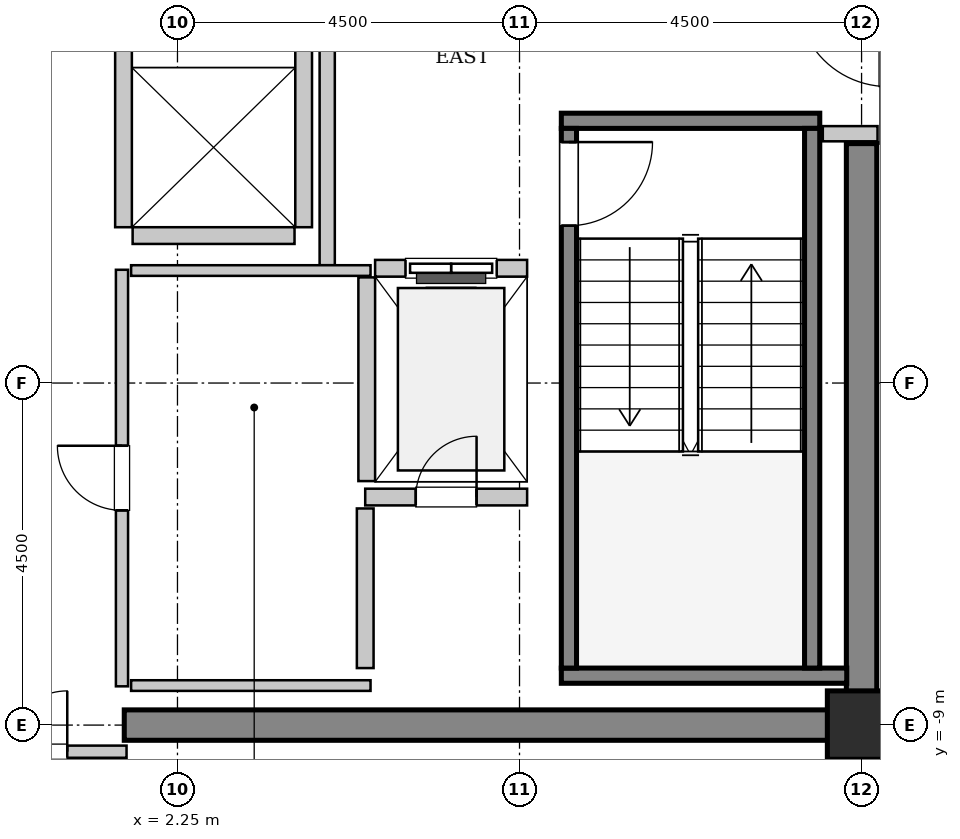
"""IFC4 building model, lengths in metres.
Left out: names, types, materials, properties, quantities, classifications, styles, units other than length and angle.
Written with IfcOpenShell. Run it as: python <this file> out.ifc"""

import sys

from ifc_helpers import new_model, si_unit, direction, frame, frame_2d, origin, origin_2d, place, context, subcontext, project, spatial, rectangle, extrude, source, transform, mapped, element, fill, save


model = new_model("IFC4")
c1 = context("Model", 3, precision=1e-05, world=origin(), true_north=direction((0.0, 1.0)))
c2 = subcontext(c1, "Body", "Model", "MODEL_VIEW")
j1 = project(units=[si_unit("LENGTHUNIT", "METRE"), si_unit("PLANEANGLEUNIT", "RADIAN")], contexts=[c1])
p1 = place(None, origin())
s1 = spatial("IfcSite", under=j1, at=p1, CompositionType="ELEMENT")
p2 = place(p1, origin())
s2 = spatial("IfcBuilding", under=s1, at=p2, CompositionType="ELEMENT")
p3 = place(p2, frame((0.0, 0.0, 326.2)))
s3 = spatial("IfcBuildingStorey", under=s2, at=p3, CompositionType="ELEMENT", Elevation=326.2)
m1 = source(origin(), c2, "Body", "SweptSolid", [
    extrude(rectangle(XDim=9.9, YDim=0.4, at=frame_2d((4.95, 0.0))), origin(), (0.0, 0.0, 1.0), 3.8),
])
p4 = place(p3, frame((1.55, -9.0, 0.0), z_axis=(0.0, 0.0, 1.0), x_axis=(1.0, 0.0, 0.0)))
e1 = element("IfcWall", 1, at=p4, inside=s3, PredefinedType="SHEAR", context=c2, shape_type="MappedRepresentation", body=[
    mapped(m1, transform((0.0, 0.0, 0.0), x_axis=(1.0, 0.0, 0.0), y_axis=(0.0, 1.0, 0.0), z_axis=(0.0, 0.0, 1.0), scale=1.0)),
])
m2 = source(origin(), c2, "Body", "SweptSolid", [
    extrude(rectangle(XDim=7.45, YDim=0.4, at=frame_2d((3.725, 0.0))), origin(), (0.0, 0.0, 1.0), 3.8),
])
p5 = place(p3, frame((11.25, -8.8, 0.0), z_axis=(0.0, 0.0, 1.0), x_axis=(0.0, 1.0, 0.0)))
e2 = element("IfcWall", 2, at=p5, inside=s3, PredefinedType="SHEAR", context=c2, shape_type="MappedRepresentation", body=[
    mapped(m2, transform((0.0, 0.0, 0.0), x_axis=(1.0, 0.0, 0.0), y_axis=(0.0, 1.0, 0.0), z_axis=(0.0, 0.0, 1.0), scale=1.0)),
])
m3 = source(origin(), c2, "Body", "SweptSolid", [
    extrude(rectangle(XDim=0.9, YDim=0.9, at=origin_2d()), origin(), (0.0, 0.0, 1.0), 3.8),
])
p6 = place(p3, frame((11.25, -9.0, 0.0), z_axis=(0.0, 0.0, 1.0), x_axis=(1.0, 0.0, 0.0)))
e3 = element("IfcColumn", 3, at=p6, inside=s3, PredefinedType="COLUMN", context=c2, shape_type="MappedRepresentation", body=[
    mapped(m3, transform((0.0, 0.0, 0.0), x_axis=(1.0, 0.0, 0.0), y_axis=(0.0, 1.0, 0.0), z_axis=(0.0, 0.0, 1.0), scale=1.0)),
])
m4 = source(origin(), c2, "Body", "SweptSolid", [
    extrude(rectangle(XDim=3.4, YDim=0.2, at=frame_2d((1.7, 0.0))), origin(), (0.0, 0.0, 1.0), 3.8),
])
p7 = place(p3, frame((7.3, -1.05, 0.0), z_axis=(0.0, 0.0, 1.0), x_axis=(1.0, 0.0, 0.0)))
e4 = element("IfcWall", 4, at=p7, inside=s3, PredefinedType="SOLIDWALL", context=c2, shape_type="MappedRepresentation", body=[
    mapped(m4, transform((0.0, 0.0, 0.0), x_axis=(1.0, 0.0, 0.0), y_axis=(0.0, 1.0, 0.0), z_axis=(0.0, 0.0, 1.0), scale=1.0)),
])
m5 = source(origin(), c2, "Body", "SweptSolid", [
    extrude(rectangle(XDim=3.755, YDim=0.2, at=frame_2d((1.877, 0.0))), origin(), (0.0, 0.0, 1.0), 3.8),
])
p8 = place(p3, frame((7.3, -8.35, 0.0), z_axis=(0.0, 0.0, 1.0), x_axis=(1.0, 0.0, 0.0)))
e5 = element("IfcWall", 5, at=p8, inside=s3, PredefinedType="SOLIDWALL", context=c2, shape_type="MappedRepresentation", body=[
    mapped(m5, transform((0.0, 0.0, 0.0), x_axis=(1.0, 0.0, 0.0), y_axis=(0.0, 1.0, 0.0), z_axis=(0.0, 0.0, 1.0), scale=1.0)),
])
m6 = source(origin(), c2, "Body", "SweptSolid", [
    extrude(rectangle(XDim=7.1, YDim=0.2, at=frame_2d((3.55, 0.0))), origin(), (0.0, 0.0, 1.0), 3.8),
])
p9 = place(p3, frame((7.4, -1.15, 0.0), z_axis=(0.0, 0.0, 1.0), x_axis=(0.0, -1.0, 0.0)))
e6 = element("IfcWall", 6, at=p9, inside=s3, PredefinedType="SOLIDWALL", context=c2, shape_type="MappedRepresentation", body=[
    mapped(m6, transform((0.0, 0.0, 0.0), x_axis=(1.0, 0.0, 0.0), y_axis=(0.0, 1.0, 0.0), z_axis=(0.0, 0.0, 1.0), scale=1.0)),
])
p10 = place(p9, frame((0.18, 0.0, 0.0)))
e7 = element("IfcOpeningElement", 7, at=p10, cuts=e6, PredefinedType="OPENING", context=c2, shape_type="SweptSolid", body=[
    extrude(rectangle(XDim=1.1, YDim=2.15, at=frame_2d((0.55, 1.075))), frame((0.0, 0.11, 0.0), z_axis=(0.0, -1.0, 0.0), x_axis=(1.0, 0.0, 0.0)), (0.0, 0.0, 1.0), 0.22),
])
p11 = place(p3, frame((10.6, -1.15, 0.0), z_axis=(0.0, 0.0, 1.0), x_axis=(0.0, -1.0, 0.0)))
e8 = element("IfcWall", 8, at=p11, inside=s3, PredefinedType="SOLIDWALL", context=c2, shape_type="MappedRepresentation", body=[
    mapped(m6, transform((0.0, 0.0, 0.0), x_axis=(1.0, 0.0, 0.0), y_axis=(0.0, 1.0, 0.0), z_axis=(0.0, 0.0, 1.0), scale=1.0)),
])
m7 = source(origin(), c2, "Body", "SweptSolid", [
    extrude(rectangle(XDim=2.0, YDim=0.22, at=frame_2d((1.0, 0.0))), origin(), (0.0, 0.0, 1.0), 3.535),
])
p12 = place(p3, frame((6.85, -2.99, 0.0), z_axis=(0.0, 0.0, 1.0), x_axis=(-1.0, 0.0, 0.0)))
e9 = element("IfcWall", 9, at=p12, inside=s3, PredefinedType="SOLIDWALL", context=c2, shape_type="MappedRepresentation", body=[
    mapped(m7, transform((0.0, 0.0, 0.0), x_axis=(1.0, 0.0, 0.0), y_axis=(0.0, 1.0, 0.0), z_axis=(0.0, 0.0, 1.0), scale=1.0)),
])
p13 = place(p12, frame((0.4, 0.0, 0.0)))
e10 = element("IfcOpeningElement", 10, at=p13, cuts=e9, PredefinedType="OPENING", context=c2, shape_type="SweptSolid", body=[
    extrude(rectangle(XDim=1.2, YDim=2.2, at=frame_2d((0.6, 1.1))), frame((0.0, 0.12, 0.0), z_axis=(0.0, -1.0, 0.0), x_axis=(1.0, 0.0, 0.0)), (0.0, 0.0, 1.0), 0.24),
])
m8 = source(origin(), c2, "Body", "SweptSolid", [
    extrude(rectangle(XDim=2.68, YDim=0.22, at=frame_2d((1.34, 0.0))), origin(), (0.0, 0.0, 1.0), 3.535),
])
p14 = place(p3, frame((4.74, -3.11, 0.0), z_axis=(0.0, 0.0, 1.0), x_axis=(0.0, -1.0, 0.0)))
e11 = element("IfcWall", 11, at=p14, inside=s3, PredefinedType="SOLIDWALL", context=c2, shape_type="MappedRepresentation", body=[
    mapped(m8, transform((0.0, 0.0, 0.0), x_axis=(1.0, 0.0, 0.0), y_axis=(0.0, 1.0, 0.0), z_axis=(0.0, 0.0, 1.0), scale=1.0)),
])
m9 = source(origin(), c2, "Body", "SweptSolid", [
    extrude(rectangle(XDim=4.9, YDim=0.22, at=frame_2d((2.45, 0.0))), origin(), (0.0, 0.0, 1.0), 3.535),
])
for number, where, z_axis, x_axis in (
    (12, (1.54, 2.45, 0.0), (0.0, 0.0, 1.0), (0.0, -1.0, 0.0)),
    (13, (3.91, -2.45, 0.0), (0.0, 0.0, 1.0), (0.0, 1.0, 0.0)),
):
    element("IfcWall", number, at=place(p3, frame(where, z_axis=z_axis, x_axis=x_axis)), inside=s3, PredefinedType="SOLIDWALL", context=c2, shape_type="MappedRepresentation", body=[
        mapped(m9, transform((0.0, 0.0, 0.0), x_axis=(1.0, 0.0, 0.0), y_axis=(0.0, 1.0, 0.0), z_axis=(0.0, 0.0, 1.0), scale=1.0)),
    ])
m10 = source(origin(), c2, "Body", "SweptSolid", [
    extrude(rectangle(XDim=2.13, YDim=0.22, at=frame_2d((1.065, 0.0))), origin(), (0.0, 0.0, 1.0), 3.535),
])
p15 = place(p3, frame((1.66, -2.56, 0.0), z_axis=(0.0, 0.0, 1.0), x_axis=(1.0, 0.0, 0.0)))
e14 = element("IfcWall", 14, at=p15, inside=s3, PredefinedType="SOLIDWALL", context=c2, shape_type="MappedRepresentation", body=[
    mapped(m10, transform((0.0, 0.0, 0.0), x_axis=(1.0, 0.0, 0.0), y_axis=(0.0, 1.0, 0.0), z_axis=(0.0, 0.0, 1.0), scale=1.0)),
])
p16 = place(p3, frame((4.72, -6.0, 0.0), z_axis=(0.0, 0.0, 1.0), x_axis=(1.0, 0.0, 0.0)))
e15 = element("IfcWall", 15, at=p16, inside=s3, PredefinedType="SOLIDWALL", context=c2, shape_type="MappedRepresentation", body=[
    mapped(m10, transform((0.0, 0.0, 0.0), x_axis=(1.0, 0.0, 0.0), y_axis=(0.0, 1.0, 0.0), z_axis=(0.0, 0.0, 1.0), scale=1.0)),
])
p17 = place(p16, frame((0.665, 0.0, 0.0)))
e16 = element("IfcOpeningElement", 16, at=p17, cuts=e15, PredefinedType="OPENING", context=c2, shape_type="SweptSolid", body=[
    extrude(rectangle(XDim=0.8, YDim=2.0, at=frame_2d((0.4, 1.0))), frame((0.0, 0.12, 0.0), z_axis=(0.0, -1.0, 0.0), x_axis=(1.0, 0.0, 0.0)), (0.0, 0.0, 1.0), 0.24),
])
m11 = source(origin(), c2, "Body", "SweptSolid", [
    extrude(rectangle(XDim=2.1, YDim=0.22, at=frame_2d((1.05, 0.0))), origin(), (0.0, 0.0, 1.0), 3.535),
])
p18 = place(p3, frame((4.72, -8.25, 0.0), z_axis=(0.0, 0.0, 1.0), x_axis=(0.0, 1.0, 0.0)))
e17 = element("IfcWall", 17, at=p18, inside=s3, PredefinedType="SOLIDWALL", context=c2, shape_type="MappedRepresentation", body=[
    mapped(m11, transform((0.0, 0.0, 0.0), x_axis=(1.0, 0.0, 0.0), y_axis=(0.0, 1.0, 0.0), z_axis=(0.0, 0.0, 1.0), scale=1.0)),
])
m12 = source(origin(), c2, "Body", "SweptSolid", [
    extrude(rectangle(XDim=5.9, YDim=0.2, at=frame_2d((2.95, 0.0))), origin(), (0.0, 0.0, 1.0), 3.535),
])
p19 = place(p3, frame((4.22, -2.95, 0.0), z_axis=(0.0, 0.0, 1.0), x_axis=(0.0, 1.0, 0.0)))
e18 = element("IfcWall", 18, at=p19, inside=s3, PredefinedType="PARTITIONING", context=c2, shape_type="MappedRepresentation", body=[
    mapped(m12, transform((0.0, 0.0, 0.0), x_axis=(1.0, 0.0, 0.0), y_axis=(0.0, 1.0, 0.0), z_axis=(0.0, 0.0, 1.0), scale=1.0)),
])
m13 = source(origin(), c2, "Body", "SweptSolid", [
    extrude(rectangle(XDim=0.72, YDim=0.2, at=frame_2d((0.36, 0.0))), origin(), (0.0, 0.0, 1.0), 3.535),
])
p20 = place(p3, frame((10.74, -1.22, 0.0), z_axis=(0.0, 0.0, 1.0), x_axis=(1.0, 0.0, 0.0)))
e19 = element("IfcWall", 19, at=p20, inside=s3, PredefinedType="PARTITIONING", context=c2, shape_type="MappedRepresentation", body=[
    mapped(m13, transform((0.0, 0.0, 0.0), x_axis=(1.0, 0.0, 0.0), y_axis=(0.0, 1.0, 0.0), z_axis=(0.0, 0.0, 1.0), scale=1.0)),
])
m14 = source(origin(), c2, "Body", "SweptSolid", [
    extrude(rectangle(XDim=3.16, YDim=0.16, at=frame_2d((1.58, 0.0))), origin(), (0.0, 0.0, 1.0), 2.625),
])
p21 = place(p3, frame((-1.58, -9.35, 0.0), z_axis=(0.0, 0.0, 1.0), x_axis=(1.0, 0.0, 0.0)))
e20 = element("IfcWall", 20, at=p21, inside=s3, PredefinedType="PARTITIONING", context=c2, shape_type="MappedRepresentation", body=[
    mapped(m14, transform((0.0, 0.0, 0.0), x_axis=(1.0, 0.0, 0.0), y_axis=(0.0, 1.0, 0.0), z_axis=(0.0, 0.0, 1.0), scale=1.0)),
])
p22 = place(p21, frame((0.78, 0.0, 0.0)))
e21 = element("IfcOpeningElement", 21, at=p22, cuts=e20, PredefinedType="OPENING", context=c2, shape_type="SweptSolid", body=[
    extrude(rectangle(XDim=1.6, YDim=2.3, at=frame_2d((0.8, 1.15))), frame((0.0, 0.09, 0.0), z_axis=(0.0, -1.0, 0.0), x_axis=(1.0, 0.0, 0.0)), (0.0, 0.0, 1.0), 0.18),
])
m15 = source(origin(), c2, "Body", "SweptSolid", [
    extrude(rectangle(XDim=5.48, YDim=0.16, at=frame_2d((2.74, 0.0))), origin(), (0.0, 0.0, 1.0), 3.535),
])
p23 = place(p3, frame((1.52, -8.49, 0.0), z_axis=(0.0, 0.0, 1.0), x_axis=(0.0, 1.0, 0.0)))
e22 = element("IfcWall", 22, at=p23, inside=s3, PredefinedType="PARTITIONING", context=c2, shape_type="MappedRepresentation", body=[
    mapped(m15, transform((0.0, 0.0, 0.0), x_axis=(1.0, 0.0, 0.0), y_axis=(0.0, 1.0, 0.0), z_axis=(0.0, 0.0, 1.0), scale=1.0)),
])
p24 = place(p23, frame((2.315, 0.0, 0.0)))
e23 = element("IfcOpeningElement", 23, at=p24, cuts=e22, PredefinedType="OPENING", context=c2, shape_type="SweptSolid", body=[
    extrude(rectangle(XDim=0.85, YDim=2.1, at=frame_2d((0.425, 1.05))), frame((0.0, 0.09, 0.0), z_axis=(0.0, -1.0, 0.0), x_axis=(1.0, 0.0, 0.0)), (0.0, 0.0, 1.0), 0.18),
])
m16 = source(origin(), c2, "Body", "SweptSolid", [
    extrude(rectangle(XDim=3.15, YDim=0.14, at=frame_2d((1.575, 0.0))), origin(), (0.0, 0.0, 1.0), 3.535),
])
for number, where, z_axis, x_axis in (
    (24, (1.64, -3.02, 0.0), (0.0, 0.0, 1.0), (1.0, 0.0, 0.0)),
    (25, (1.64, -8.48, 0.0), (0.0, 0.0, 1.0), (1.0, 0.0, 0.0)),
):
    element("IfcWall", number, at=place(p3, frame(where, z_axis=z_axis, x_axis=x_axis)), inside=s3, PredefinedType="PARTITIONING", context=c2, shape_type="MappedRepresentation", body=[
        mapped(m16, transform((0.0, 0.0, 0.0), x_axis=(1.0, 0.0, 0.0), y_axis=(0.0, 1.0, 0.0), z_axis=(0.0, 0.0, 1.0), scale=1.0)),
    ])
m17 = source(origin(), c2, "Body", "SweptSolid", [
    extrude(rectangle(XDim=1.1, YDim=2.15, at=frame_2d((0.55, 1.075))), frame((0.0, 0.025, 0.0), z_axis=(0.0, -1.0, 0.0), x_axis=(1.0, 0.0, 0.0)), (0.0, 0.0, 1.0), 0.05),
])
p25 = place(p10, origin())
e26 = element("IfcDoor", 26, at=p25, inside=s3, OperationType="SINGLE_SWING_LEFT", PredefinedType="DOOR", context=c2, shape_type="MappedRepresentation", body=[
    mapped(m17, transform((0.0, 0.0, 0.0), x_axis=(1.0, 0.0, 0.0), y_axis=(0.0, 1.0, 0.0), z_axis=(0.0, 0.0, 1.0), scale=1.0)),
])
fill(e7, e26)
m18 = source(origin(), c2, "Body", "SweptSolid", [
    extrude(rectangle(XDim=1.2, YDim=2.2, at=frame_2d((0.6, 1.1))), frame((0.0, 0.025, 0.0), z_axis=(0.0, -1.0, 0.0), x_axis=(1.0, 0.0, 0.0)), (0.0, 0.0, 1.0), 0.05),
])
p26 = place(p13, origin())
e27 = element("IfcDoor", 27, at=p26, inside=s3, OperationType="SLIDING_TO_LEFT", PredefinedType="DOOR", context=c2, shape_type="MappedRepresentation", body=[
    mapped(m18, transform((0.0, 0.0, 0.0), x_axis=(1.0, 0.0, 0.0), y_axis=(0.0, 1.0, 0.0), z_axis=(0.0, 0.0, 1.0), scale=1.0)),
])
fill(e10, e27)
m19 = source(origin(), c2, "Body", "SweptSolid", [
    extrude(rectangle(XDim=0.8, YDim=2.0, at=frame_2d((0.4, 1.0))), frame((0.0, 0.025, 0.0), z_axis=(0.0, -1.0, 0.0), x_axis=(1.0, 0.0, 0.0)), (0.0, 0.0, 1.0), 0.05),
])
p27 = place(p17, origin())
e28 = element("IfcDoor", 28, at=p27, inside=s3, OperationType="SINGLE_SWING_RIGHT", PredefinedType="TRAPDOOR", context=c2, shape_type="MappedRepresentation", body=[
    mapped(m19, transform((0.0, 0.0, 0.0), x_axis=(1.0, 0.0, 0.0), y_axis=(0.0, 1.0, 0.0), z_axis=(0.0, 0.0, 1.0), scale=1.0)),
])
fill(e16, e28)
m20 = source(origin(), c2, "Body", "SweptSolid", [
    extrude(rectangle(XDim=1.6, YDim=2.3, at=frame_2d((0.8, 1.15))), frame((0.0, 0.025, 0.0), z_axis=(0.0, -1.0, 0.0), x_axis=(1.0, 0.0, 0.0)), (0.0, 0.0, 1.0), 0.05),
])
p28 = place(p22, origin())
e29 = element("IfcDoor", 29, at=p28, inside=s3, OperationType="DOUBLE_DOOR_SINGLE_SWING", PredefinedType="DOOR", context=c2, shape_type="MappedRepresentation", body=[
    mapped(m20, transform((0.0, 0.0, 0.0), x_axis=(1.0, 0.0, 0.0), y_axis=(0.0, 1.0, 0.0), z_axis=(0.0, 0.0, 1.0), scale=1.0)),
])
fill(e21, e29)
m21 = source(origin(), c2, "Body", "SweptSolid", [
    extrude(rectangle(XDim=0.85, YDim=2.1, at=frame_2d((0.425, 1.05))), frame((0.0, 0.025, 0.0), z_axis=(0.0, -1.0, 0.0), x_axis=(1.0, 0.0, 0.0)), (0.0, 0.0, 1.0), 0.05),
])
p29 = place(p24, origin())
e30 = element("IfcDoor", 30, at=p29, inside=s3, OperationType="SINGLE_SWING_RIGHT", PredefinedType="DOOR", context=c2, shape_type="MappedRepresentation", body=[
    mapped(m21, transform((0.0, 0.0, 0.0), x_axis=(1.0, 0.0, 0.0), y_axis=(0.0, 1.0, 0.0), z_axis=(0.0, 0.0, 1.0), scale=1.0)),
])
fill(e23, e30)
save(model, sys.argv[1])
